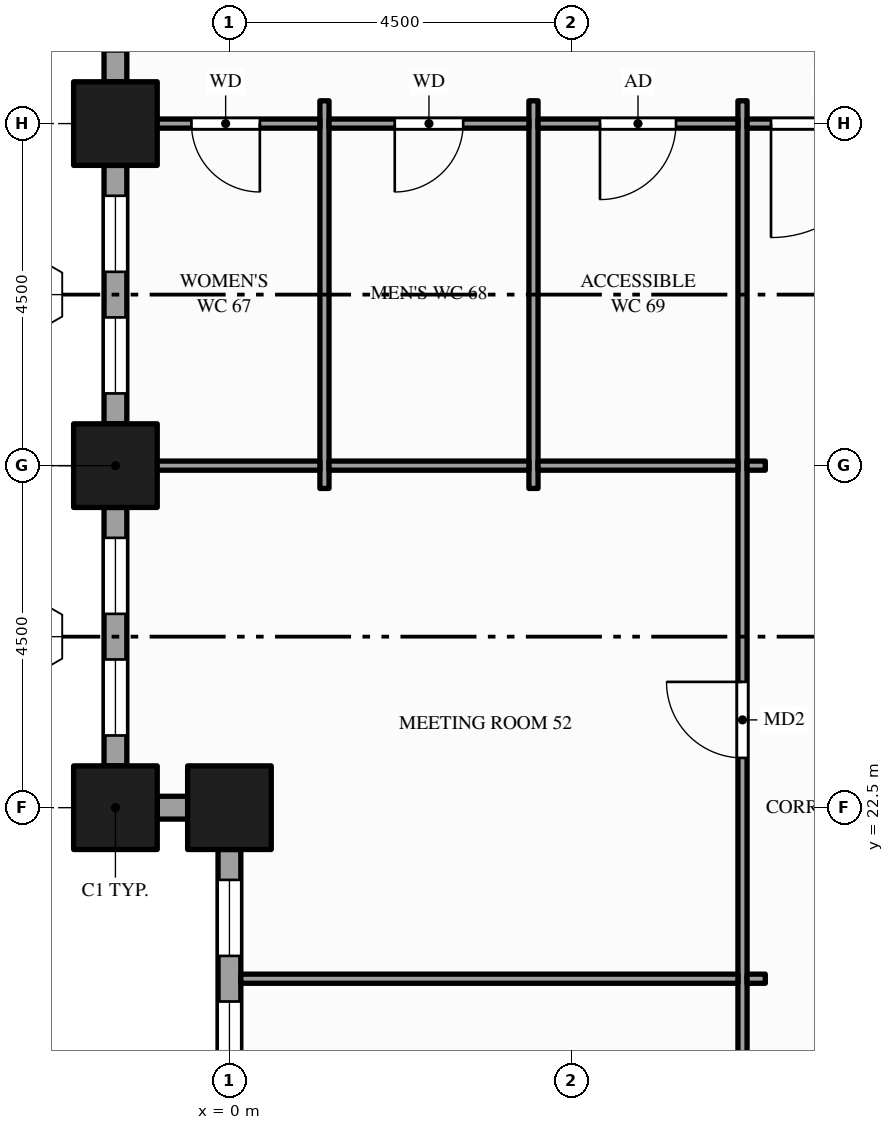
"""IFC4 building model, lengths in metres.
Left out: names, types, materials, properties, quantities, classifications, styles, units other than length and angle.
Written with IfcOpenShell. Run it as: python <this file> out.ifc"""

import sys

from ifc_helpers import new_model, si_unit, direction, frame, frame_2d, origin, origin_2d, place, context, subcontext, project, spatial, rectangle, hollow_rectangle, extrude, element, fill, save


model = new_model("IFC4")
c1 = context("Model", 3, precision=1e-05, world=origin(), true_north=direction((0.0, 1.0)))
c2 = subcontext(c1, "Body", "Model", "MODEL_VIEW")
j1 = project(units=[si_unit("LENGTHUNIT", "METRE"), si_unit("PLANEANGLEUNIT", "RADIAN")], contexts=[c1])
p1 = place(None, origin())
s1 = spatial("IfcSite", under=j1, at=p1, CompositionType="ELEMENT")
p2 = place(p1, origin())
s2 = spatial("IfcBuilding", under=s1, at=p2, CompositionType="ELEMENT")
p3 = place(p2, frame((0.0, 0.0, 45.0)))
s3 = spatial("IfcBuildingStorey", under=s2, at=p3, CompositionType="ELEMENT", Elevation=45.0)
for number, where, z_axis, x_axis in (
    (1, (-1.5, 22.5, -0.15), (0.0, 0.0, 1.0), (1.0, 0.0, 0.0)),
    (2, (-1.5, 27.0, -0.15), (0.0, 0.0, 1.0), (1.0, 0.0, 0.0)),
    (3, (-1.5, 31.5, -0.15), (0.0, 0.0, 1.0), (1.0, 0.0, 0.0)),
    (4, (0.0, 22.5, -0.15), (0.0, 0.0, 1.0), (1.0, 0.0, 0.0)),
):
    element("IfcColumn", number, at=place(p3, frame(where, z_axis=z_axis, x_axis=x_axis)), inside=s3, PredefinedType="COLUMN", context=c2, shape_type="SweptSolid", body=[
        extrude(hollow_rectangle(XDim=1.1, YDim=1.1, WallThickness=0.06, at=origin_2d()), origin(), (0.0, 0.0, 1.0), 4.0),
    ])
p4 = place(p3, frame((-1.5, 35.45, 0.0), z_axis=(0.0, 0.0, 1.0), x_axis=(0.0, -1.0, 0.0)))
e5 = element("IfcWall", 5, at=p4, inside=s3, PredefinedType="STANDARD", context=c2, shape_type="SweptSolid", body=[
    extrude(rectangle(XDim=3.4, YDim=0.3, at=frame_2d((1.7, 0.0))), origin(), (0.0, 0.0, 1.0), 3.144),
])
p5 = place(p4, frame((0.4, 0.0, 0.9)))
e6 = element("IfcOpeningElement", 6, at=p5, cuts=e5, PredefinedType="OPENING", context=c2, shape_type="SweptSolid", body=[
    extrude(rectangle(XDim=1.0, YDim=2.0, at=frame_2d((0.5, 1.0))), frame((0.0, 0.16, 0.0), z_axis=(0.0, -1.0, 0.0), x_axis=(1.0, 0.0, 0.0)), (0.0, 0.0, 1.0), 0.32),
])
p6 = place(p4, frame((2.0, 0.0, 0.9)))
e7 = element("IfcOpeningElement", 7, at=p6, cuts=e5, PredefinedType="OPENING", context=c2, shape_type="SweptSolid", body=[
    extrude(rectangle(XDim=1.0, YDim=2.0, at=frame_2d((0.5, 1.0))), frame((0.0, 0.16, 0.0), z_axis=(0.0, -1.0, 0.0), x_axis=(1.0, 0.0, 0.0)), (0.0, 0.0, 1.0), 0.32),
])
p7 = place(p3, frame((-1.5, 30.95, 0.0), z_axis=(0.0, 0.0, 1.0), x_axis=(0.0, -1.0, 0.0)))
e8 = element("IfcWall", 8, at=p7, inside=s3, PredefinedType="STANDARD", context=c2, shape_type="SweptSolid", body=[
    extrude(rectangle(XDim=3.4, YDim=0.3, at=frame_2d((1.7, 0.0))), origin(), (0.0, 0.0, 1.0), 3.144),
])
p8 = place(p7, frame((0.4, 0.0, 0.9)))
e9 = element("IfcOpeningElement", 9, at=p8, cuts=e8, PredefinedType="OPENING", context=c2, shape_type="SweptSolid", body=[
    extrude(rectangle(XDim=1.0, YDim=2.0, at=frame_2d((0.5, 1.0))), frame((0.0, 0.16, 0.0), z_axis=(0.0, -1.0, 0.0), x_axis=(1.0, 0.0, 0.0)), (0.0, 0.0, 1.0), 0.32),
])
p9 = place(p7, frame((2.0, 0.0, 0.9)))
e10 = element("IfcOpeningElement", 10, at=p9, cuts=e8, PredefinedType="OPENING", context=c2, shape_type="SweptSolid", body=[
    extrude(rectangle(XDim=1.0, YDim=2.0, at=frame_2d((0.5, 1.0))), frame((0.0, 0.16, 0.0), z_axis=(0.0, -1.0, 0.0), x_axis=(1.0, 0.0, 0.0)), (0.0, 0.0, 1.0), 0.32),
])
p10 = place(p3, frame((-1.5, 26.45, 0.0), z_axis=(0.0, 0.0, 1.0), x_axis=(0.0, -1.0, 0.0)))
e11 = element("IfcWall", 11, at=p10, inside=s3, PredefinedType="STANDARD", context=c2, shape_type="SweptSolid", body=[
    extrude(rectangle(XDim=3.4, YDim=0.3, at=frame_2d((1.7, 0.0))), origin(), (0.0, 0.0, 1.0), 3.144),
])
p11 = place(p10, frame((0.4, 0.0, 0.9)))
e12 = element("IfcOpeningElement", 12, at=p11, cuts=e11, PredefinedType="OPENING", context=c2, shape_type="SweptSolid", body=[
    extrude(rectangle(XDim=1.0, YDim=2.0, at=frame_2d((0.5, 1.0))), frame((0.0, 0.16, 0.0), z_axis=(0.0, -1.0, 0.0), x_axis=(1.0, 0.0, 0.0)), (0.0, 0.0, 1.0), 0.32),
])
p12 = place(p10, frame((2.0, 0.0, 0.9)))
e13 = element("IfcOpeningElement", 13, at=p12, cuts=e11, PredefinedType="OPENING", context=c2, shape_type="SweptSolid", body=[
    extrude(rectangle(XDim=1.0, YDim=2.0, at=frame_2d((0.5, 1.0))), frame((0.0, 0.16, 0.0), z_axis=(0.0, -1.0, 0.0), x_axis=(1.0, 0.0, 0.0)), (0.0, 0.0, 1.0), 0.32),
])
p13 = place(p3, frame((-0.95, 22.5, 0.0), z_axis=(0.0, 0.0, 1.0), x_axis=(1.0, 0.0, 0.0)))
e14 = element("IfcWall", 14, at=p13, inside=s3, PredefinedType="STANDARD", context=c2, shape_type="SweptSolid", body=[
    extrude(rectangle(XDim=0.4, YDim=0.3, at=frame_2d((0.2, 0.0))), origin(), (0.0, 0.0, 1.0), 3.144),
])
p14 = place(p3, frame((0.0, 21.95, 0.0), z_axis=(0.0, 0.0, 1.0), x_axis=(0.0, -1.0, 0.0)))
e15 = element("IfcWall", 15, at=p14, inside=s3, PredefinedType="STANDARD", context=c2, shape_type="SweptSolid", body=[
    extrude(rectangle(XDim=3.4, YDim=0.3, at=frame_2d((1.7, 0.0))), origin(), (0.0, 0.0, 1.0), 3.144),
])
p15 = place(p14, frame((0.4, 0.0, 0.9)))
e16 = element("IfcOpeningElement", 16, at=p15, cuts=e15, PredefinedType="OPENING", context=c2, shape_type="SweptSolid", body=[
    extrude(rectangle(XDim=1.0, YDim=2.0, at=frame_2d((0.5, 1.0))), frame((0.0, 0.16, 0.0), z_axis=(0.0, -1.0, 0.0), x_axis=(1.0, 0.0, 0.0)), (0.0, 0.0, 1.0), 0.32),
])
p16 = place(p14, frame((2.0, 0.0, 0.9)))
e17 = element("IfcOpeningElement", 17, at=p16, cuts=e15, PredefinedType="OPENING", context=c2, shape_type="SweptSolid", body=[
    extrude(rectangle(XDim=1.0, YDim=2.0, at=frame_2d((0.5, 1.0))), frame((0.0, 0.16, 0.0), z_axis=(0.0, -1.0, 0.0), x_axis=(1.0, 0.0, 0.0)), (0.0, 0.0, 1.0), 0.32),
])
for number, where, z_axis, x_axis in (
    (18, (1.25, 26.7, 0.0), (0.0, 0.0, 1.0), (0.0, 1.0, 0.0)),
    (19, (4.0, 26.7, 0.0), (0.0, 0.0, 1.0), (0.0, 1.0, 0.0)),
):
    element("IfcWall", number, at=place(p3, frame(where, z_axis=z_axis, x_axis=x_axis)), inside=s3, PredefinedType="PARTITIONING", context=c2, shape_type="SweptSolid", body=[
        extrude(rectangle(XDim=5.1, YDim=0.12, at=frame_2d((2.55, 0.0))), origin(), (0.0, 0.0, 1.0), 3.85),
    ])
p17 = place(p3, frame((6.75, 13.2, 0.0), z_axis=(0.0, 0.0, 1.0), x_axis=(0.0, 1.0, 0.0)))
e20 = element("IfcWall", 20, at=p17, inside=s3, PredefinedType="PARTITIONING", context=c2, shape_type="SweptSolid", body=[
    extrude(rectangle(XDim=18.6, YDim=0.12, at=frame_2d((9.3, 0.0))), origin(), (0.0, 0.0, 1.0), 2.6),
])
p18 = place(p17, frame((3.175, 0.0, 0.0)))
e21 = element("IfcOpeningElement", 21, at=p18, cuts=e20, PredefinedType="OPENING", context=c2, shape_type="SweptSolid", body=[
    extrude(rectangle(XDim=1.0, YDim=2.1, at=frame_2d((0.5, 1.05))), frame((0.0, 0.07, 0.0), z_axis=(0.0, -1.0, 0.0), x_axis=(1.0, 0.0, 0.0)), (0.0, 0.0, 1.0), 0.14),
])
p19 = place(p17, frame((9.955, 0.0, 0.0)))
e22 = element("IfcOpeningElement", 22, at=p19, cuts=e20, PredefinedType="OPENING", context=c2, shape_type="SweptSolid", body=[
    extrude(rectangle(XDim=1.0, YDim=2.1, at=frame_2d((0.5, 1.05))), frame((0.0, 0.07, 0.0), z_axis=(0.0, -1.0, 0.0), x_axis=(1.0, 0.0, 0.0)), (0.0, 0.0, 1.0), 0.14),
])
p20 = place(p3, frame((0.15, 20.25, 0.0), z_axis=(0.0, 0.0, 1.0), x_axis=(1.0, 0.0, 0.0)))
e23 = element("IfcWall", 23, at=p20, inside=s3, PredefinedType="PARTITIONING", context=c2, shape_type="SweptSolid", body=[
    extrude(rectangle(XDim=6.54, YDim=0.12, at=frame_2d((3.27, 0.0))), origin(), (0.0, 0.0, 1.0), 2.938),
])
p21 = place(p3, frame((6.81, 20.25, 0.0), z_axis=(0.0, 0.0, 1.0), x_axis=(1.0, 0.0, 0.0)))
e24 = element("IfcWall", 24, at=p21, inside=s3, PredefinedType="PARTITIONING", context=c2, shape_type="SweptSolid", body=[
    extrude(rectangle(XDim=0.24, YDim=0.12, at=frame_2d((0.12, 0.0))), origin(), (0.0, 0.0, 1.0), 2.938),
])
p22 = place(p3, frame((-1.35, 27.0, 0.0), z_axis=(0.0, 0.0, 1.0), x_axis=(1.0, 0.0, 0.0)))
e25 = element("IfcWall", 25, at=p22, inside=s3, PredefinedType="PARTITIONING", context=c2, shape_type="SweptSolid", body=[
    extrude(rectangle(XDim=2.54, YDim=0.12, at=frame_2d((1.27, 0.0))), origin(), (0.0, 0.0, 1.0), 2.938),
])
for number, where, z_axis, x_axis in (
    (26, (1.31, 27.0, 0.0), (0.0, 0.0, 1.0), (1.0, 0.0, 0.0)),
    (27, (4.06, 27.0, 0.0), (0.0, 0.0, 1.0), (1.0, 0.0, 0.0)),
):
    element("IfcWall", number, at=place(p3, frame(where, z_axis=z_axis, x_axis=x_axis)), inside=s3, PredefinedType="PARTITIONING", context=c2, shape_type="SweptSolid", body=[
        extrude(rectangle(XDim=2.63, YDim=0.12, at=frame_2d((1.315, 0.0))), origin(), (0.0, 0.0, 1.0), 2.938),
    ])
p23 = place(p3, frame((6.81, 27.0, 0.0), z_axis=(0.0, 0.0, 1.0), x_axis=(1.0, 0.0, 0.0)))
e28 = element("IfcWall", 28, at=p23, inside=s3, PredefinedType="PARTITIONING", context=c2, shape_type="SweptSolid", body=[
    extrude(rectangle(XDim=0.24, YDim=0.12, at=frame_2d((0.12, 0.0))), origin(), (0.0, 0.0, 1.0), 2.938),
])
p24 = place(p3, frame((-1.35, 31.5, 0.0), z_axis=(0.0, 0.0, 1.0), x_axis=(1.0, 0.0, 0.0)))
e29 = element("IfcWall", 29, at=p24, inside=s3, PredefinedType="PARTITIONING", context=c2, shape_type="SweptSolid", body=[
    extrude(rectangle(XDim=2.54, YDim=0.12, at=frame_2d((1.27, 0.0))), origin(), (0.0, 0.0, 1.0), 2.938),
])
p25 = place(p24, frame((0.85, 0.0, 0.0)))
e30 = element("IfcOpeningElement", 30, at=p25, cuts=e29, PredefinedType="OPENING", context=c2, shape_type="SweptSolid", body=[
    extrude(rectangle(XDim=0.9, YDim=2.1, at=frame_2d((0.45, 1.05))), frame((0.0, 0.07, 0.0), z_axis=(0.0, -1.0, 0.0), x_axis=(1.0, 0.0, 0.0)), (0.0, 0.0, 1.0), 0.14),
])
p26 = place(p3, frame((1.31, 31.5, 0.0), z_axis=(0.0, 0.0, 1.0), x_axis=(1.0, 0.0, 0.0)))
e31 = element("IfcWall", 31, at=p26, inside=s3, PredefinedType="PARTITIONING", context=c2, shape_type="SweptSolid", body=[
    extrude(rectangle(XDim=2.63, YDim=0.12, at=frame_2d((1.315, 0.0))), origin(), (0.0, 0.0, 1.0), 2.938),
])
p27 = place(p26, frame((0.865, 0.0, 0.0)))
e32 = element("IfcOpeningElement", 32, at=p27, cuts=e31, PredefinedType="OPENING", context=c2, shape_type="SweptSolid", body=[
    extrude(rectangle(XDim=0.9, YDim=2.1, at=frame_2d((0.45, 1.05))), frame((0.0, 0.07, 0.0), z_axis=(0.0, -1.0, 0.0), x_axis=(1.0, 0.0, 0.0)), (0.0, 0.0, 1.0), 0.14),
])
p28 = place(p3, frame((4.06, 31.5, 0.0), z_axis=(0.0, 0.0, 1.0), x_axis=(1.0, 0.0, 0.0)))
e33 = element("IfcWall", 33, at=p28, inside=s3, PredefinedType="PARTITIONING", context=c2, shape_type="SweptSolid", body=[
    extrude(rectangle(XDim=2.63, YDim=0.12, at=frame_2d((1.315, 0.0))), origin(), (0.0, 0.0, 1.0), 2.938),
])
p29 = place(p28, frame((0.815, 0.0, 0.0)))
e34 = element("IfcOpeningElement", 34, at=p29, cuts=e33, PredefinedType="OPENING", context=c2, shape_type="SweptSolid", body=[
    extrude(rectangle(XDim=1.0, YDim=2.1, at=frame_2d((0.5, 1.05))), frame((0.0, 0.07, 0.0), z_axis=(0.0, -1.0, 0.0), x_axis=(1.0, 0.0, 0.0)), (0.0, 0.0, 1.0), 0.14),
])
p30 = place(p3, frame((6.81, 31.5, 0.0), z_axis=(0.0, 0.0, 1.0), x_axis=(1.0, 0.0, 0.0)))
e35 = element("IfcWall", 35, at=p30, inside=s3, PredefinedType="PARTITIONING", context=c2, shape_type="SweptSolid", body=[
    extrude(rectangle(XDim=2.13, YDim=0.12, at=frame_2d((1.065, 0.0))), origin(), (0.0, 0.0, 1.0), 2.938),
])
p31 = place(p30, frame((0.315, 0.0, 0.0)))
e36 = element("IfcOpeningElement", 36, at=p31, cuts=e35, PredefinedType="OPENING", context=c2, shape_type="SweptSolid", body=[
    extrude(rectangle(XDim=1.5, YDim=2.1, at=frame_2d((0.75, 1.05))), frame((0.0, 0.07, 0.0), z_axis=(0.0, -1.0, 0.0), x_axis=(1.0, 0.0, 0.0)), (0.0, 0.0, 1.0), 0.14),
])
p32 = place(p8, origin())
e37 = element("IfcWindow", 37, at=p32, inside=s3, PartitioningType="SINGLE_PANEL", PredefinedType="WINDOW", context=c2, shape_type="SweptSolid", body=[
    extrude(rectangle(XDim=1.0, YDim=2.0, at=frame_2d((0.5, 1.0))), frame((0.0, 0.03, 0.0), z_axis=(0.0, -1.0, 0.0), x_axis=(1.0, 0.0, 0.0)), (0.0, 0.0, 1.0), 0.06),
])
fill(e9, e37)
p33 = place(p9, origin())
e38 = element("IfcWindow", 38, at=p33, inside=s3, PartitioningType="SINGLE_PANEL", PredefinedType="WINDOW", context=c2, shape_type="SweptSolid", body=[
    extrude(rectangle(XDim=1.0, YDim=2.0, at=frame_2d((0.5, 1.0))), frame((0.0, 0.03, 0.0), z_axis=(0.0, -1.0, 0.0), x_axis=(1.0, 0.0, 0.0)), (0.0, 0.0, 1.0), 0.06),
])
fill(e10, e38)
p34 = place(p11, origin())
e39 = element("IfcWindow", 39, at=p34, inside=s3, PartitioningType="SINGLE_PANEL", PredefinedType="WINDOW", context=c2, shape_type="SweptSolid", body=[
    extrude(rectangle(XDim=1.0, YDim=2.0, at=frame_2d((0.5, 1.0))), frame((0.0, 0.03, 0.0), z_axis=(0.0, -1.0, 0.0), x_axis=(1.0, 0.0, 0.0)), (0.0, 0.0, 1.0), 0.06),
])
fill(e12, e39)
p35 = place(p12, origin())
e40 = element("IfcWindow", 40, at=p35, inside=s3, PartitioningType="SINGLE_PANEL", PredefinedType="WINDOW", context=c2, shape_type="SweptSolid", body=[
    extrude(rectangle(XDim=1.0, YDim=2.0, at=frame_2d((0.5, 1.0))), frame((0.0, 0.03, 0.0), z_axis=(0.0, -1.0, 0.0), x_axis=(1.0, 0.0, 0.0)), (0.0, 0.0, 1.0), 0.06),
])
fill(e13, e40)
p36 = place(p15, origin())
e41 = element("IfcWindow", 41, at=p36, inside=s3, PartitioningType="SINGLE_PANEL", PredefinedType="WINDOW", context=c2, shape_type="SweptSolid", body=[
    extrude(rectangle(XDim=1.0, YDim=2.0, at=frame_2d((0.5, 1.0))), frame((0.0, 0.03, 0.0), z_axis=(0.0, -1.0, 0.0), x_axis=(1.0, 0.0, 0.0)), (0.0, 0.0, 1.0), 0.06),
])
fill(e16, e41)
p37 = place(p16, origin())
e42 = element("IfcWindow", 42, at=p37, inside=s3, PartitioningType="SINGLE_PANEL", PredefinedType="WINDOW", context=c2, shape_type="SweptSolid", body=[
    extrude(rectangle(XDim=1.0, YDim=2.0, at=frame_2d((0.5, 1.0))), frame((0.0, 0.03, 0.0), z_axis=(0.0, -1.0, 0.0), x_axis=(1.0, 0.0, 0.0)), (0.0, 0.0, 1.0), 0.06),
])
fill(e17, e42)
p38 = place(p31, origin())
e43 = element("IfcDoor", 43, at=p38, inside=s3, OperationType="SINGLE_SWING_LEFT", PredefinedType="DOOR", context=c2, shape_type="SweptSolid", body=[
    extrude(rectangle(XDim=1.5, YDim=2.1, at=frame_2d((0.75, 1.05))), frame((0.0, 0.025, 0.0), z_axis=(0.0, -1.0, 0.0), x_axis=(1.0, 0.0, 0.0)), (0.0, 0.0, 1.0), 0.05),
])
fill(e36, e43)
p39 = place(p19, origin())
e44 = element("IfcDoor", 44, at=p39, inside=s3, OperationType="SINGLE_SWING_RIGHT", PredefinedType="DOOR", context=c2, shape_type="SweptSolid", body=[
    extrude(rectangle(XDim=1.0, YDim=2.1, at=frame_2d((0.5, 1.05))), frame((0.0, 0.025, 0.0), z_axis=(0.0, -1.0, 0.0), x_axis=(1.0, 0.0, 0.0)), (0.0, 0.0, 1.0), 0.05),
])
fill(e22, e44)
p40 = place(p25, origin())
e45 = element("IfcDoor", 45, at=p40, inside=s3, OperationType="SINGLE_SWING_RIGHT", PredefinedType="DOOR", context=c2, shape_type="SweptSolid", body=[
    extrude(rectangle(XDim=0.9, YDim=2.1, at=frame_2d((0.45, 1.05))), frame((0.0, 0.025, 0.0), z_axis=(0.0, -1.0, 0.0), x_axis=(1.0, 0.0, 0.0)), (0.0, 0.0, 1.0), 0.05),
])
fill(e30, e45)
p41 = place(p27, origin())
e46 = element("IfcDoor", 46, at=p41, inside=s3, OperationType="SINGLE_SWING_LEFT", PredefinedType="DOOR", context=c2, shape_type="SweptSolid", body=[
    extrude(rectangle(XDim=0.9, YDim=2.1, at=frame_2d((0.45, 1.05))), frame((0.0, 0.025, 0.0), z_axis=(0.0, -1.0, 0.0), x_axis=(1.0, 0.0, 0.0)), (0.0, 0.0, 1.0), 0.05),
])
fill(e32, e46)
p42 = place(p29, origin())
e47 = element("IfcDoor", 47, at=p42, inside=s3, OperationType="SINGLE_SWING_LEFT", PredefinedType="DOOR", context=c2, shape_type="SweptSolid", body=[
    extrude(rectangle(XDim=1.0, YDim=2.1, at=frame_2d((0.5, 1.05))), frame((0.0, 0.025, 0.0), z_axis=(0.0, -1.0, 0.0), x_axis=(1.0, 0.0, 0.0)), (0.0, 0.0, 1.0), 0.05),
])
fill(e34, e47)
save(model, sys.argv[1])
